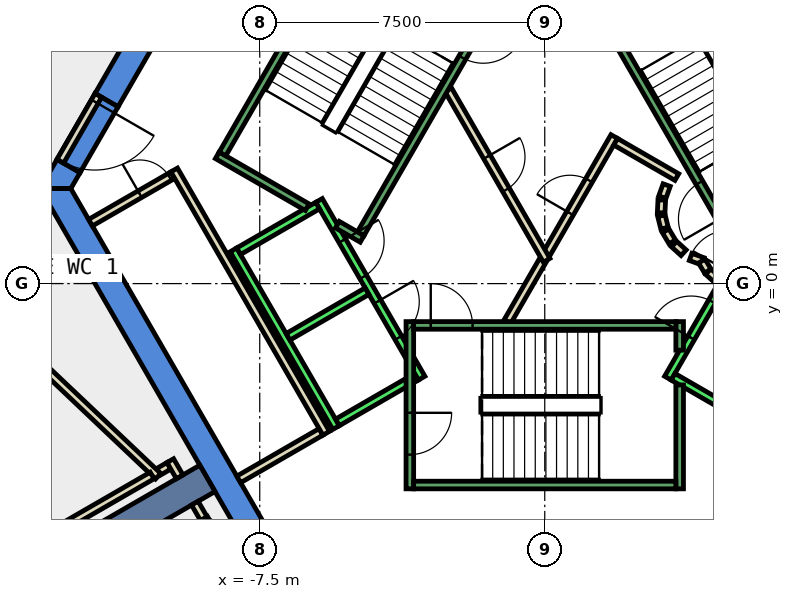
"""IFC4 building model, lengths in metres.
Left out: names, types, materials, properties, quantities, classifications, styles, units other than length and angle.
Written with IfcOpenShell. Run it as: python <this file> out.ifc"""

import sys

from ifc_helpers import new_model, si_unit, direction, frame, frame_2d, origin, place, context, subcontext, project, spatial, polyline, rectangle, outline, extrude, element, fill, save


model = new_model("IFC4")
c1 = context("Model", 3, precision=1e-05, world=origin(), true_north=direction((0.0, 1.0)))
c2 = subcontext(c1, "Body", "Model", "MODEL_VIEW")
j1 = project(units=[si_unit("LENGTHUNIT", "METRE"), si_unit("PLANEANGLEUNIT", "RADIAN")], contexts=[c1])
p1 = place(None, origin())
s1 = spatial("IfcSite", under=j1, at=p1, CompositionType="ELEMENT")
p2 = place(p1, origin())
s2 = spatial("IfcBuilding", under=s1, at=p2, CompositionType="ELEMENT")
p3 = place(p2, frame((0.0, 0.0, 206.6)))
s3 = spatial("IfcBuildingStorey", under=s2, at=p3, CompositionType="ELEMENT", Elevation=206.6)
p4 = place(p3, frame((0.0, 0.0, -0.4)))
e1 = element("IfcWall", 1, at=p4, inside=s3, PredefinedType="SHEAR", context=c2, shape_type="SweptSolid", body=[
    extrude(outline(polyline([(-11.834, 5.002), (-11.228, 4.652), (-6.235, 13.3), (-6.64, 14.0), (-11.834, 5.002)])), origin(), (0.0, 0.0, 1.0), 4.2),
])
p5 = place(p3, frame((0.0, 0.0, -0.4)))
e2 = element("IfcWall", 2, at=p5, inside=s3, PredefinedType="SHEAR", context=c2, shape_type="SweptSolid", body=[
    extrude(outline(polyline([(-12.228, 2.92), (-12.834, 3.27), (-13.279, 2.5), (-12.471, 2.5), (-12.228, 2.92)])), origin(), (0.0, 0.0, 1.0), 4.2),
])
p6 = place(p3, frame((0.0, 0.0, 3.6)))
e3 = element("IfcWall", 3, at=p6, inside=s3, PredefinedType="SHEAR", context=c2, shape_type="SweptSolid", body=[
    extrude(outline(polyline([(-12.834, 3.27), (-12.228, 2.92), (-11.228, 4.652), (-11.834, 5.002), (-12.834, 3.27)])), origin(), (0.0, 0.0, 1.0), 0.2),
])
p7 = place(p3, frame((0.0, 0.0, -0.4)))
e4 = element("IfcWall", 4, at=p7, inside=s3, PredefinedType="SHEAR", context=c2, shape_type="SweptSolid", body=[
    extrude(outline(polyline([(-13.279, 2.5), (-6.64, -9.0), (-6.235, -8.3), (-12.471, 2.5), (-13.279, 2.5)])), origin(), (0.0, 0.0, 1.0), 4.2),
])
p8 = place(p3, frame((-8.877, -5.125, -0.4), z_axis=(0.0, 0.0, 1.0), x_axis=(-0.866017533419, -0.500013631625, 0.0)))
e5 = element("IfcWall", 5, at=p8, inside=s3, PredefinedType="SHEAR", context=c2, shape_type="SweptSolid", body=[
    extrude(rectangle(XDim=9.0, YDim=0.8, at=frame_2d((4.5, 0.0))), origin(), (0.0, 0.0, 1.0), 4.2),
])
p9 = place(p3, frame((-5.888, -3.902, 0.0), z_axis=(0.0, 0.0, 1.0), x_axis=(-0.866022959057, -0.500004234368, 0.0)))
e6 = element("IfcWall", 6, at=p9, inside=s3, PredefinedType="PARTITIONING", context=c2, shape_type="SweptSolid", body=[
    extrude(rectangle(XDim=2.5, YDim=0.2, at=frame_2d((1.25, 0.0))), origin(), (0.0, 0.0, 1.0), 3.8),
])
p10 = place(p3, frame((-11.953, 1.603, 0.0), z_axis=(0.0, 0.0, 1.0), x_axis=(0.865998541277, 0.500046524342, 0.0)))
e7 = element("IfcWall", 7, at=p10, inside=s3, PredefinedType="PARTITIONING", context=c2, shape_type="SweptSolid", body=[
    extrude(rectangle(XDim=2.5, YDim=0.2, at=frame_2d((1.25, 0.0))), origin(), (0.0, 0.0, 1.0), 3.8),
])
p11 = place(p10, frame((1.5, 0.0, 0.0)))
e8 = element("IfcOpeningElement", 8, at=p11, cuts=e7, PredefinedType="OPENING", context=c2, shape_type="SweptSolid", body=[
    extrude(rectangle(XDim=0.9, YDim=2.1, at=frame_2d((0.45, 1.05))), frame((0.0, 0.11, 0.0), z_axis=(0.0, -1.0, 0.0), x_axis=(1.0, 0.0, 0.0)), (0.0, 0.0, 1.0), 0.22),
])
p12 = place(p3, frame((-9.751, 2.99, 0.0), z_axis=(0.0, 0.0, 1.0), x_axis=(0.500012163284, -0.866018381195, 0.0)))
e9 = element("IfcWall", 9, at=p12, inside=s3, PredefinedType="PARTITIONING", context=c2, shape_type="SweptSolid", body=[
    extrude(rectangle(XDim=8.0, YDim=0.2, at=frame_2d((4.0, 0.0))), origin(), (0.0, 0.0, 1.0), 3.8),
])
p13 = place(p3, frame((-0.982, -1.0, 0.0), z_axis=(0.0, 0.0, 1.0), x_axis=(0.50024047865, 0.865886518847, 0.0)))
e10 = element("IfcWall", 10, at=p13, inside=s3, PredefinedType="PARTITIONING", context=c2, shape_type="SweptSolid", body=[
    extrude(rectangle(XDim=1.863, YDim=0.2, at=frame_2d((0.931, 0.0))), origin(), (0.0, 0.0, 1.0), 3.8),
])
p14 = place(p3, frame((0.05, 0.787, 0.0), z_axis=(0.0, 0.0, 1.0), x_axis=(0.499954076797, 0.866051915934, 0.0)))
e11 = element("IfcWall", 11, at=p14, inside=s3, PredefinedType="PARTITIONING", context=c2, shape_type="SweptSolid", body=[
    extrude(rectangle(XDim=3.558, YDim=0.2, at=frame_2d((1.779, 0.0))), origin(), (0.0, 0.0, 1.0), 3.8),
])
p15 = place(p14, frame((1.229, 0.0, 0.0)))
e12 = element("IfcOpeningElement", 12, at=p15, cuts=e11, PredefinedType="OPENING", context=c2, shape_type="SweptSolid", body=[
    extrude(rectangle(XDim=1.0, YDim=2.1, at=frame_2d((0.5, 1.05))), frame((0.0, 0.11, 0.0), z_axis=(0.0, -1.0, 0.0), x_axis=(1.0, 0.0, 0.0)), (0.0, 0.0, 1.0), 0.22),
])
p16 = place(p3, frame((1.866, 3.732, 0.0), z_axis=(0.0, 0.0, 1.0), x_axis=(0.866043361281, -0.499968895414, 0.0)))
e13 = element("IfcWall", 13, at=p16, inside=s3, PredefinedType="PARTITIONING", context=c2, shape_type="SweptSolid", body=[
    extrude(rectangle(XDim=1.858, YDim=0.2, at=frame_2d((0.929, 0.0))), origin(), (0.0, 0.0, 1.0), 3.8),
])
p17 = place(p3, frame((3.208, 2.592, 0.0), z_axis=(0.0, 0.0, 1.0), x_axis=(-0.337388820924, -0.941365382578, 0.0)))
e14 = element("IfcWall", 14, at=p17, inside=s3, PredefinedType="PARTITIONING", context=c2, shape_type="SweptSolid", body=[
    extrude(rectangle(XDim=0.338, YDim=0.2, at=frame_2d((0.169, 0.0))), origin(), (0.0, 0.0, 1.0), 3.8),
])
p18 = place(p3, frame((3.079, 2.199, 0.0), z_axis=(0.0, 0.0, 1.0), x_axis=(-0.047771483479, -0.998858290933, 0.0)))
e15 = element("IfcWall", 15, at=p18, inside=s3, PredefinedType="PARTITIONING", context=c2, shape_type="SweptSolid", body=[
    extrude(rectangle(XDim=0.337, YDim=0.2, at=frame_2d((0.169, 0.0))), origin(), (0.0, 0.0, 1.0), 3.8),
])
p19 = place(p3, frame((3.07, 1.786, 0.0), z_axis=(0.0, 0.0, 1.0), x_axis=(0.242705583207, -0.970099994784, 0.0)))
e16 = element("IfcWall", 16, at=p19, inside=s3, PredefinedType="PARTITIONING", context=c2, shape_type="SweptSolid", body=[
    extrude(rectangle(XDim=0.338, YDim=0.2, at=frame_2d((0.169, 0.0))), origin(), (0.0, 0.0, 1.0), 3.8),
])
for number, where, z_axis, x_axis in (
    (17, (3.182, 1.388, 0.0), (0.0, 0.0, 1.0), (0.512, -0.859, 0.0)),
    (18, (3.404, 1.039, 0.0), (0.0, 0.0, 1.0), (0.74, -0.672, 0.0)),
):
    element("IfcWall", number, at=place(p3, frame(where, z_axis=z_axis, x_axis=x_axis)), inside=s3, PredefinedType="PARTITIONING", context=c2, shape_type="SweptSolid", body=[
        extrude(rectangle(XDim=0.338, YDim=0.2, at=frame_2d((0.169, 0.0))), origin(), (0.0, 0.0, 1.0), 3.8),
    ])
p20 = place(p3, frame((3.838, 0.702, 0.0), z_axis=(0.0, 0.0, 1.0), x_axis=(0.941035081519, -0.338308993895, 0.0)))
e19 = element("IfcWall", 19, at=p20, inside=s3, PredefinedType="PARTITIONING", context=c2, shape_type="SweptSolid", body=[
    extrude(rectangle(XDim=0.337, YDim=0.2, at=frame_2d((0.168, 0.0))), origin(), (0.0, 0.0, 1.0), 3.8),
])
p21 = place(p3, frame((4.132, 0.593, 0.0), z_axis=(0.0, 0.0, 1.0), x_axis=(0.513561617048, -0.858052717201, 0.0)))
e20 = element("IfcWall", 20, at=p21, inside=s3, PredefinedType="PARTITIONING", context=c2, shape_type="SweptSolid", body=[
    extrude(rectangle(XDim=0.308, YDim=0.2, at=frame_2d((0.154, 0.0))), origin(), (0.0, 0.0, 1.0), 3.8),
])
p22 = place(p3, frame((4.301, 0.315, 0.0), z_axis=(0.0, 0.0, 1.0), x_axis=(0.741798017506, -0.670623367639, 0.0)))
e21 = element("IfcWall", 21, at=p22, inside=s3, PredefinedType="PARTITIONING", context=c2, shape_type="SweptSolid", body=[
    extrude(rectangle(XDim=0.309, YDim=0.2, at=frame_2d((0.154, 0.0))), origin(), (0.0, 0.0, 1.0), 3.8),
])
p23 = place(p3, frame((-2.54, 5.1, 0.0), z_axis=(0.0, 0.0, 1.0), x_axis=(0.499925051871, -0.866068670783, 0.0)))
e22 = element("IfcWall", 22, at=p23, inside=s3, PredefinedType="PARTITIONING", context=c2, shape_type="SweptSolid", body=[
    extrude(rectangle(XDim=5.181, YDim=0.2, at=frame_2d((2.59, 0.0))), origin(), (0.0, 0.0, 1.0), 3.8),
])
p24 = place(p23, frame((2.04, 0.0, 0.0)))
e23 = element("IfcOpeningElement", 23, at=p24, cuts=e22, PredefinedType="OPENING", context=c2, shape_type="SweptSolid", body=[
    extrude(rectangle(XDim=1.0, YDim=2.1, at=frame_2d((0.5, 1.05))), frame((0.0, 0.11, 0.0), z_axis=(0.0, -1.0, 0.0), x_axis=(1.0, 0.0, 0.0)), (0.0, 0.0, 1.0), 0.22),
])
p25 = place(p3, frame((-7.283, -9.086, 0.0), z_axis=(0.0, 0.0, 1.0), x_axis=(-0.499883958536, 0.86609238999, 0.0)))
e24 = element("IfcWall", 24, at=p25, inside=s3, PredefinedType="PARTITIONING", context=c2, shape_type="SweptSolid", body=[
    extrude(rectangle(XDim=3.359, YDim=0.2, at=frame_2d((1.679, 0.0))), origin(), (0.0, 0.0, 1.0), 3.8),
])
p26 = place(p3, frame((-8.973, -6.183, 0.0), z_axis=(0.0, 0.0, 1.0), x_axis=(-0.499557093027, 0.86628096528, 0.0)))
e25 = element("IfcWall", 25, at=p26, inside=s3, PredefinedType="PARTITIONING", context=c2, shape_type="SweptSolid", body=[
    extrude(rectangle(XDim=0.469, YDim=0.2, at=frame_2d((0.234, 0.0))), origin(), (0.0, 0.0, 1.0), 3.8),
])
p27 = place(p3, frame((-9.89, -4.795, 0.0), z_axis=(0.0, 0.0, 1.0), x_axis=(-0.866447259568, -0.499268611457, 0.0)))
e26 = element("IfcWall", 26, at=p27, inside=s3, PredefinedType="PARTITIONING", context=c2, shape_type="SweptSolid", body=[
    extrude(rectangle(XDim=0.311, YDim=0.2, at=frame_2d((0.155, 0.0))), origin(), (0.0, 0.0, 1.0), 3.8),
])
p28 = place(p3, frame((-10.173, -5.069, 0.0), z_axis=(0.0, 0.0, 1.0), x_axis=(-0.725908697087, 0.687791075468, 0.0)))
e27 = element("IfcWall", 27, at=p28, inside=s3, PredefinedType="PARTITIONING", context=c2, shape_type="SweptSolid", body=[
    extrude(rectangle(XDim=8.313, YDim=0.2, at=frame_2d((4.157, 0.0))), origin(), (0.0, 0.0, 1.0), 3.8),
])
p29 = place(p3, frame((-15.076, -7.788, 0.0), z_axis=(0.0, 0.0, 1.0), x_axis=(0.866092814325, 0.499883223337, 0.0)))
e28 = element("IfcWall", 28, at=p29, inside=s3, PredefinedType="PARTITIONING", context=c2, shape_type="SweptSolid", body=[
    extrude(rectangle(XDim=5.477, YDim=0.2, at=frame_2d((2.739, 0.0))), origin(), (0.0, 0.0, 1.0), 3.8),
])
p30 = place(p3, frame((-11.747, 4.952, 0.0), z_axis=(0.0, 0.0, 1.0), x_axis=(-0.50002537861, -0.866010750942, 0.0)))
e29 = element("IfcWall", 29, at=p30, inside=s3, PredefinedType="PARTITIONING", context=c2, shape_type="SweptSolid", body=[
    extrude(rectangle(XDim=2.0, YDim=0.2, at=frame_2d((1.0, 0.0))), origin(), (0.0, 0.0, 1.0), 2.4),
])
p31 = place(p30, frame((0.19, 0.0, 0.0)))
e30 = element("IfcOpeningElement", 30, at=p31, cuts=e29, PredefinedType="OPENING", context=c2, shape_type="SweptSolid", body=[
    extrude(rectangle(XDim=1.8, YDim=2.1, at=frame_2d((0.9, 1.05))), frame((0.0, 0.11, 0.0), z_axis=(0.0, -1.0, 0.0), x_axis=(1.0, 0.0, 0.0)), (0.0, 0.0, 1.0), 0.22),
])
p32 = place(p3, frame((-9.607, -5.084, 0.0), z_axis=(0.0, 0.0, 1.0), x_axis=(-0.500194922027, 0.865912836248, 0.0)))
e31 = element("IfcWall", 31, at=p32, inside=s3, PredefinedType="PARTITIONING", context=c2, shape_type="SweptSolid", body=[
    extrude(rectangle(XDim=0.492, YDim=0.2, at=frame_2d((0.246, 0.0))), origin(), (0.0, 0.0, 1.0), 3.8),
])
p33 = place(p3, frame((-5.94, 2.188, 0.0), z_axis=(0.0, 0.0, 1.0), x_axis=(0.500034260056, -0.866005622828, 0.0)))
e32 = element("IfcWall", 32, at=p33, inside=s3, PredefinedType="STANDARD", context=c2, shape_type="SweptSolid", body=[
    extrude(rectangle(XDim=5.399, YDim=0.2, at=frame_2d((2.7, 0.0))), origin(), (0.0, 0.0, 1.0), 3.8),
])
p34 = place(p33, frame((3.075, 0.0, 0.0)))
e33 = element("IfcOpeningElement", 33, at=p34, cuts=e32, PredefinedType="OPENING", context=c2, shape_type="SweptSolid", body=[
    extrude(rectangle(XDim=1.1, YDim=2.1, at=frame_2d((0.55, 1.05))), frame((0.0, 0.11, 0.0), z_axis=(0.0, -1.0, 0.0), x_axis=(1.0, 0.0, 0.0)), (0.0, 0.0, 1.0), 0.22),
])
p35 = place(p33, frame((1.225, 0.0, 0.0)))
e34 = element("IfcOpeningElement", 34, at=p35, cuts=e32, PredefinedType="OPENING", context=c2, shape_type="SweptSolid", body=[
    extrude(rectangle(XDim=1.1, YDim=2.1, at=frame_2d((0.55, 1.05))), frame((0.0, 0.11, 0.0), z_axis=(0.0, -1.0, 0.0), x_axis=(1.0, 0.0, 0.0)), (0.0, 0.0, 1.0), 0.22),
])
p36 = place(p3, frame((-8.192, 0.888, 0.0), z_axis=(0.0, 0.0, 1.0), x_axis=(0.500034260056, -0.866005622828, 0.0)))
e35 = element("IfcWall", 35, at=p36, inside=s3, PredefinedType="STANDARD", context=c2, shape_type="SweptSolid", body=[
    extrude(rectangle(XDim=5.399, YDim=0.2, at=frame_2d((2.7, 0.0))), origin(), (0.0, 0.0, 1.0), 3.8),
])
for number, where, z_axis, x_axis in (
    (36, (-5.977, 2.052, 0.0), (0.0, 0.0, 1.0), (-0.866, -0.5, 0.0)),
    (37, (-4.677, -0.2, 0.0), (0.0, 0.0, 1.0), (-0.866, -0.5, 0.0)),
):
    element("IfcWall", number, at=place(p3, frame(where, z_axis=z_axis, x_axis=x_axis)), inside=s3, PredefinedType="STANDARD", context=c2, shape_type="SweptSolid", body=[
        extrude(rectangle(XDim=2.399, YDim=0.2, at=frame_2d((1.2, 0.0))), origin(), (0.0, 0.0, 1.0), 3.8),
    ])
p37 = place(p3, frame((-3.377, -2.452, 0.0), z_axis=(0.0, 0.0, 1.0), x_axis=(-0.865955154139, -0.50012165622, 0.0)))
e38 = element("IfcWall", 38, at=p37, inside=s3, PredefinedType="STANDARD", context=c2, shape_type="SweptSolid", body=[
    extrude(rectangle(XDim=2.4, YDim=0.2, at=frame_2d((1.2, 0.0))), origin(), (0.0, 0.0, 1.0), 3.8),
])
p38 = place(p3, frame((3.24, -2.488, 0.0), z_axis=(0.0, 0.0, 1.0), x_axis=(0.500034260056, 0.866005622828, 0.0)))
e39 = element("IfcWall", 39, at=p38, inside=s3, PredefinedType="STANDARD", context=c2, shape_type="SweptSolid", body=[
    extrude(rectangle(XDim=5.399, YDim=0.2, at=frame_2d((2.7, 0.0))), origin(), (0.0, 0.0, 1.0), 3.8),
])
p39 = place(p38, frame((3.225, 0.0, 0.0)))
e40 = element("IfcOpeningElement", 40, at=p39, cuts=e39, PredefinedType="OPENING", context=c2, shape_type="SweptSolid", body=[
    extrude(rectangle(XDim=1.1, YDim=2.1, at=frame_2d((0.55, 1.05))), frame((0.0, 0.11, 0.0), z_axis=(0.0, -1.0, 0.0), x_axis=(1.0, 0.0, 0.0)), (0.0, 0.0, 1.0), 0.22),
])
p40 = place(p38, frame((1.225, 0.0, 0.0)))
e41 = element("IfcOpeningElement", 41, at=p40, cuts=e39, PredefinedType="OPENING", context=c2, shape_type="SweptSolid", body=[
    extrude(rectangle(XDim=1.1, YDim=2.1, at=frame_2d((0.55, 1.05))), frame((0.0, 0.11, 0.0), z_axis=(0.0, -1.0, 0.0), x_axis=(1.0, 0.0, 0.0)), (0.0, 0.0, 1.0), 0.22),
])
p41 = place(p3, frame((3.377, -2.452, 0.0), z_axis=(0.0, 0.0, 1.0), x_axis=(0.865955154139, -0.50012165622, 0.0)))
e42 = element("IfcWall", 42, at=p41, inside=s3, PredefinedType="STANDARD", context=c2, shape_type="SweptSolid", body=[
    extrude(rectangle(XDim=2.4, YDim=0.2, at=frame_2d((1.2, 0.0))), origin(), (0.0, 0.0, 1.0), 3.8),
])
p42 = place(p3, frame((-3.55, -1.0, 0.0), z_axis=(0.0, 0.0, 1.0), x_axis=(0.0, -1.0, 0.0)))
e43 = element("IfcWall", 43, at=p42, inside=s3, PredefinedType="STANDARD", context=c2, shape_type="SweptSolid", body=[
    extrude(rectangle(XDim=4.4, YDim=0.2, at=frame_2d((2.2, 0.0))), origin(), (0.0, 0.0, 1.0), 3.8),
])
p43 = place(p42, frame((2.4, 0.0, 0.0)))
e44 = element("IfcOpeningElement", 44, at=p43, cuts=e43, PredefinedType="OPENING", context=c2, shape_type="SweptSolid", body=[
    extrude(rectangle(XDim=1.1, YDim=2.2, at=frame_2d((0.55, 1.1))), frame((0.0, 0.11, 0.0), z_axis=(0.0, -1.0, 0.0), x_axis=(1.0, 0.0, 0.0)), (0.0, 0.0, 1.0), 0.22),
])
p44 = place(p3, frame((3.55, -2.667, 0.0), z_axis=(0.0, 0.0, 1.0), x_axis=(0.0, -1.0, 0.0)))
e45 = element("IfcWall", 45, at=p44, inside=s3, PredefinedType="STANDARD", context=c2, shape_type="SweptSolid", body=[
    extrude(rectangle(XDim=2.733, YDim=0.2, at=frame_2d((1.366, 0.0))), origin(), (0.0, 0.0, 1.0), 3.8),
])
p45 = place(p3, frame((3.55, -1.0, 0.0), z_axis=(0.0, 0.0, 1.0), x_axis=(0.0, -1.0, 0.0)))
e46 = element("IfcWall", 46, at=p45, inside=s3, PredefinedType="STANDARD", context=c2, shape_type="SweptSolid", body=[
    extrude(rectangle(XDim=0.751, YDim=0.2, at=frame_2d((0.375, 0.0))), origin(), (0.0, 0.0, 1.0), 3.8),
])
p46 = place(p3, frame((-3.45, -1.1, 0.0), z_axis=(0.0, 0.0, 1.0), x_axis=(1.0, 0.0, 0.0)))
e47 = element("IfcWall", 47, at=p46, inside=s3, PredefinedType="STANDARD", context=c2, shape_type="SweptSolid", body=[
    extrude(rectangle(XDim=6.9, YDim=0.2, at=frame_2d((3.45, 0.0))), origin(), (0.0, 0.0, 1.0), 3.8),
])
p47 = place(p46, frame((0.45, 0.0, 0.0)))
e48 = element("IfcOpeningElement", 48, at=p47, cuts=e47, PredefinedType="OPENING", context=c2, shape_type="SweptSolid", body=[
    extrude(rectangle(XDim=1.1, YDim=2.2, at=frame_2d((0.55, 1.1))), frame((0.0, 0.11, 0.0), z_axis=(0.0, -1.0, 0.0), x_axis=(1.0, 0.0, 0.0)), (0.0, 0.0, 1.0), 0.22),
])
p48 = place(p3, frame((-3.45, -5.3, 0.0), z_axis=(0.0, 0.0, 1.0), x_axis=(1.0, 0.0, 0.0)))
e49 = element("IfcWall", 49, at=p48, inside=s3, PredefinedType="STANDARD", context=c2, shape_type="SweptSolid", body=[
    extrude(rectangle(XDim=6.9, YDim=0.2, at=frame_2d((3.45, 0.0))), origin(), (0.0, 0.0, 1.0), 3.8),
])
p49 = place(p3, frame((4.843, 1.312, 0.0), z_axis=(0.0, 0.0, 1.0), x_axis=(-0.499963383562, 0.866046543262, 0.0)))
e50 = element("IfcWall", 50, at=p49, inside=s3, PredefinedType="STANDARD", context=c2, shape_type="SweptSolid", body=[
    extrude(rectangle(XDim=6.9, YDim=0.2, at=frame_2d((3.45, 0.0))), origin(), (0.0, 0.0, 1.0), 3.8),
])
p50 = place(p49, frame((0.45, 0.0, 0.0)))
e51 = element("IfcOpeningElement", 51, at=p50, cuts=e50, PredefinedType="OPENING", context=c2, shape_type="SweptSolid", body=[
    extrude(rectangle(XDim=1.1, YDim=2.2, at=frame_2d((0.55, 1.1))), frame((0.0, 0.11, 0.0), z_axis=(0.0, -1.0, 0.0), x_axis=(1.0, 0.0, 0.0)), (0.0, 0.0, 1.0), 0.22),
])
p51 = place(p3, frame((-6.25, 2.01, 0.0), z_axis=(0.0, 0.0, 1.0), x_axis=(-0.86611865017, 0.499838457731, 0.0)))
e52 = element("IfcWall", 52, at=p51, inside=s3, PredefinedType="STANDARD", context=c2, shape_type="SweptSolid", body=[
    extrude(rectangle(XDim=2.733, YDim=0.2, at=frame_2d((1.366, 0.0))), origin(), (0.0, 0.0, 1.0), 3.8),
])
p52 = place(p3, frame((-4.806, 1.176, 0.0), z_axis=(0.0, 0.0, 1.0), x_axis=(-0.866558586415, 0.499075361355, 0.0)))
e53 = element("IfcWall", 53, at=p52, inside=s3, PredefinedType="STANDARD", context=c2, shape_type="SweptSolid", body=[
    extrude(rectangle(XDim=0.751, YDim=0.2, at=frame_2d((0.376, 0.0))), origin(), (0.0, 0.0, 1.0), 3.8),
])
p53 = place(p3, frame((-1.393, 7.288, 0.0), z_axis=(0.0, 0.0, 1.0), x_axis=(-0.499963383562, -0.866046543262, 0.0)))
e54 = element("IfcWall", 54, at=p53, inside=s3, PredefinedType="STANDARD", context=c2, shape_type="SweptSolid", body=[
    extrude(rectangle(XDim=6.9, YDim=0.2, at=frame_2d((3.45, 0.0))), origin(), (0.0, 0.0, 1.0), 3.8),
])
p54 = place(p53, frame((0.45, 0.0, 0.0)))
e55 = element("IfcOpeningElement", 55, at=p54, cuts=e54, PredefinedType="OPENING", context=c2, shape_type="SweptSolid", body=[
    extrude(rectangle(XDim=1.1, YDim=2.2, at=frame_2d((0.55, 1.1))), frame((0.0, 0.11, 0.0), z_axis=(0.0, -1.0, 0.0), x_axis=(1.0, 0.0, 0.0)), (0.0, 0.0, 1.0), 0.22),
])
p55 = place(p3, frame((-5.03, 9.388, 0.0), z_axis=(0.0, 0.0, 1.0), x_axis=(-0.499978703459, -0.866037698999, 0.0)))
e56 = element("IfcWall", 56, at=p55, inside=s3, PredefinedType="STANDARD", context=c2, shape_type="SweptSolid", body=[
    extrude(rectangle(XDim=6.9, YDim=0.2, at=frame_2d((3.45, 0.0))), origin(), (0.0, 0.0, 1.0), 3.8),
])
p56 = place(p15, origin())
e57 = element("IfcDoor", 57, at=p56, inside=s3, OperationType="SINGLE_SWING_RIGHT", PredefinedType="DOOR", context=c2, shape_type="SweptSolid", body=[
    extrude(rectangle(XDim=1.0, YDim=2.1, at=frame_2d((0.5, 1.05))), frame((0.0, 0.025, 0.0), z_axis=(0.0, -1.0, 0.0), x_axis=(1.0, 0.0, 0.0)), (0.0, 0.0, 1.0), 0.05),
])
fill(e12, e57)
p57 = place(p24, origin())
e58 = element("IfcDoor", 58, at=p57, inside=s3, OperationType="SINGLE_SWING_RIGHT", PredefinedType="DOOR", context=c2, shape_type="SweptSolid", body=[
    extrude(rectangle(XDim=1.0, YDim=2.1, at=frame_2d((0.5, 1.05))), frame((0.0, 0.025, 0.0), z_axis=(0.0, -1.0, 0.0), x_axis=(1.0, 0.0, 0.0)), (0.0, 0.0, 1.0), 0.05),
])
fill(e23, e58)
p58 = place(p11, origin())
e59 = element("IfcDoor", 59, at=p58, inside=s3, OperationType="SINGLE_SWING_LEFT", PredefinedType="DOOR", context=c2, shape_type="SweptSolid", body=[
    extrude(rectangle(XDim=0.9, YDim=2.1, at=frame_2d((0.45, 1.05))), frame((0.0, 0.025, 0.0), z_axis=(0.0, -1.0, 0.0), x_axis=(1.0, 0.0, 0.0)), (0.0, 0.0, 1.0), 0.05),
])
fill(e8, e59)
p59 = place(p31, origin())
e60 = element("IfcDoor", 60, at=p59, inside=s3, OperationType="DOUBLE_DOOR_SINGLE_SWING", PredefinedType="DOOR", context=c2, shape_type="SweptSolid", body=[
    extrude(rectangle(XDim=1.8, YDim=2.1, at=frame_2d((0.9, 1.05))), frame((0.0, 0.025, 0.0), z_axis=(0.0, -1.0, 0.0), x_axis=(1.0, 0.0, 0.0)), (0.0, 0.0, 1.0), 0.05),
])
fill(e30, e60)
p60 = place(p34, origin())
e61 = element("IfcDoor", 61, at=p60, inside=s3, OperationType="SLIDING_TO_LEFT", PredefinedType="DOOR", context=c2, shape_type="SweptSolid", body=[
    extrude(rectangle(XDim=1.1, YDim=2.1, at=frame_2d((0.55, 1.05))), frame((0.0, 0.025, 0.0), z_axis=(0.0, -1.0, 0.0), x_axis=(1.0, 0.0, 0.0)), (0.0, 0.0, 1.0), 0.05),
])
fill(e33, e61)
p61 = place(p40, origin())
e62 = element("IfcDoor", 62, at=p61, inside=s3, OperationType="SLIDING_TO_LEFT", PredefinedType="DOOR", context=c2, shape_type="SweptSolid", body=[
    extrude(rectangle(XDim=1.1, YDim=2.1, at=frame_2d((0.55, 1.05))), frame((0.0, 0.025, 0.0), z_axis=(0.0, -1.0, 0.0), x_axis=(1.0, 0.0, 0.0)), (0.0, 0.0, 1.0), 0.05),
])
fill(e41, e62)
p62 = place(p35, origin())
e63 = element("IfcDoor", 63, at=p62, inside=s3, OperationType="SLIDING_TO_LEFT", PredefinedType="DOOR", context=c2, shape_type="SweptSolid", body=[
    extrude(rectangle(XDim=1.1, YDim=2.1, at=frame_2d((0.55, 1.05))), frame((0.0, 0.025, 0.0), z_axis=(0.0, -1.0, 0.0), x_axis=(1.0, 0.0, 0.0)), (0.0, 0.0, 1.0), 0.05),
])
fill(e34, e63)
p63 = place(p47, origin())
e64 = element("IfcDoor", 64, at=p63, inside=s3, OperationType="SINGLE_SWING_LEFT", PredefinedType="DOOR", context=c2, shape_type="SweptSolid", body=[
    extrude(rectangle(XDim=1.1, YDim=2.2, at=frame_2d((0.55, 1.1))), frame((0.0, 0.025, 0.0), z_axis=(0.0, -1.0, 0.0), x_axis=(1.0, 0.0, 0.0)), (0.0, 0.0, 1.0), 0.05),
])
fill(e48, e64)
p64 = place(p43, origin())
e65 = element("IfcDoor", 65, at=p64, inside=s3, OperationType="SINGLE_SWING_LEFT", PredefinedType="DOOR", context=c2, shape_type="SweptSolid", body=[
    extrude(rectangle(XDim=1.1, YDim=2.2, at=frame_2d((0.55, 1.1))), frame((0.0, 0.025, 0.0), z_axis=(0.0, -1.0, 0.0), x_axis=(1.0, 0.0, 0.0)), (0.0, 0.0, 1.0), 0.05),
])
fill(e44, e65)
p65 = place(p50, origin())
e66 = element("IfcDoor", 66, at=p65, inside=s3, OperationType="SINGLE_SWING_LEFT", PredefinedType="DOOR", context=c2, shape_type="SweptSolid", body=[
    extrude(rectangle(XDim=1.1, YDim=2.2, at=frame_2d((0.55, 1.1))), frame((0.0, 0.025, 0.0), z_axis=(0.0, -1.0, 0.0), x_axis=(1.0, 0.0, 0.0)), (0.0, 0.0, 1.0), 0.05),
])
fill(e51, e66)
p66 = place(p54, origin())
e67 = element("IfcDoor", 67, at=p66, inside=s3, OperationType="SINGLE_SWING_LEFT", PredefinedType="DOOR", context=c2, shape_type="SweptSolid", body=[
    extrude(rectangle(XDim=1.1, YDim=2.2, at=frame_2d((0.55, 1.1))), frame((0.0, 0.025, 0.0), z_axis=(0.0, -1.0, 0.0), x_axis=(1.0, 0.0, 0.0)), (0.0, 0.0, 1.0), 0.05),
])
fill(e55, e67)
save(model, sys.argv[1])
